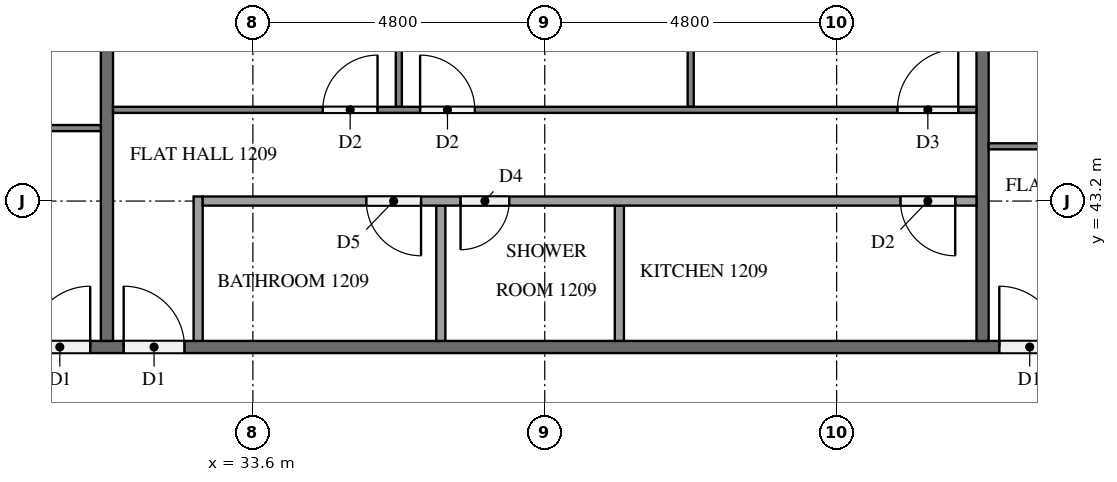
"""IFC4 building model, lengths in metres.
Left out: names, types, materials, properties, quantities, classifications, styles, units other than length and angle.
Written with IfcOpenShell. Run it as: python <this file> out.ifc"""

import sys

from ifc_helpers import new_model, si_unit, direction, frame, frame_2d, origin, place, context, subcontext, project, spatial, rectangle, extrude, element, fill, save


model = new_model("IFC4")
c1 = context("Model", 3, precision=1e-05, world=origin(), true_north=direction((0.0, 1.0)))
c2 = subcontext(c1, "Body", "Model", "MODEL_VIEW")
j1 = project(units=[si_unit("LENGTHUNIT", "METRE"), si_unit("PLANEANGLEUNIT", "RADIAN")], contexts=[c1])
p1 = place(None, origin())
s1 = spatial("IfcSite", under=j1, at=p1, CompositionType="ELEMENT")
p2 = place(p1, origin())
s2 = spatial("IfcBuilding", under=s1, at=p2, CompositionType="ELEMENT")
p3 = place(p2, frame((0.0, 0.0, 50.4)))
s3 = spatial("IfcBuildingStorey", under=s2, at=p3, CompositionType="ELEMENT", Elevation=50.4)
p4 = place(p3, frame((11.9, 40.8, 0.0), z_axis=(0.0, 0.0, 1.0), x_axis=(1.0, 0.0, 0.0)))
e1 = element("IfcWall", 1, at=p4, inside=s3, PredefinedType="PARTITIONING", context=c2, shape_type="SweptSolid", body=[
    extrude(rectangle(XDim=38.6, YDim=0.2, at=frame_2d((19.3, 0.0))), origin(), (0.0, 0.0, 1.0), 3.1),
])
p5 = place(p4, frame((33.975, 0.0, 0.0)))
e2 = element("IfcOpeningElement", 2, at=p5, cuts=e1, PredefinedType="OPENING", context=c2, shape_type="SweptSolid", body=[
    extrude(rectangle(XDim=1.0, YDim=2.1, at=frame_2d((0.5, 1.05))), frame((0.0, 0.11, 0.0), z_axis=(0.0, -1.0, 0.0), x_axis=(1.0, 0.0, 0.0)), (0.0, 0.0, 1.0), 0.22),
])
p6 = place(p4, frame((19.575, 0.0, 0.0)))
e3 = element("IfcOpeningElement", 3, at=p6, cuts=e1, PredefinedType="OPENING", context=c2, shape_type="SweptSolid", body=[
    extrude(rectangle(XDim=1.0, YDim=2.1, at=frame_2d((0.5, 1.05))), frame((0.0, 0.11, 0.0), z_axis=(0.0, -1.0, 0.0), x_axis=(1.0, 0.0, 0.0)), (0.0, 0.0, 1.0), 0.22),
])
p7 = place(p4, frame((18.025, 0.0, 0.0)))
e4 = element("IfcOpeningElement", 4, at=p7, cuts=e1, PredefinedType="OPENING", context=c2, shape_type="SweptSolid", body=[
    extrude(rectangle(XDim=1.0, YDim=2.1, at=frame_2d((0.5, 1.05))), frame((0.0, 0.11, 0.0), z_axis=(0.0, -1.0, 0.0), x_axis=(1.0, 0.0, 0.0)), (0.0, 0.0, 1.0), 0.22),
])
p8 = place(p4, frame((3.625, 0.0, 0.0)))
e5 = element("IfcOpeningElement", 5, at=p8, cuts=e1, PredefinedType="OPENING", context=c2, shape_type="SweptSolid", body=[
    extrude(rectangle(XDim=1.0, YDim=2.1, at=frame_2d((0.5, 1.05))), frame((0.0, 0.11, 0.0), z_axis=(0.0, -1.0, 0.0), x_axis=(1.0, 0.0, 0.0)), (0.0, 0.0, 1.0), 0.22),
])
for number, where, z_axis, x_axis in (
    (6, (45.6, 47.9, 0.0), (0.0, 0.0, 1.0), (0.0, -1.0, 0.0)),
    (7, (31.2, 47.9, 0.0), (0.0, 0.0, 1.0), (0.0, -1.0, 0.0)),
):
    element("IfcWall", number, at=place(p3, frame(where, z_axis=z_axis, x_axis=x_axis)), inside=s3, PredefinedType="PARTITIONING", context=c2, shape_type="SweptSolid", body=[
        extrude(rectangle(XDim=7.0, YDim=0.2, at=frame_2d((3.5, 0.0))), origin(), (0.0, 0.0, 1.0), 3.1),
    ])
p9 = place(p3, frame((45.7, 44.1, 0.0), z_axis=(0.0, 0.0, 1.0), x_axis=(1.0, 0.0, 0.0)))
e8 = element("IfcWall", 8, at=p9, inside=s3, PredefinedType="PARTITIONING", context=c2, shape_type="SweptSolid", body=[
    extrude(rectangle(XDim=11.559, YDim=0.1, at=frame_2d((5.779, 0.0))), origin(), (0.0, 0.0, 1.0), 3.1),
])
p10 = place(p9, frame((3.45, 0.0, 0.0)))
e9 = element("IfcOpeningElement", 9, at=p10, cuts=e8, PredefinedType="OPENING", context=c2, shape_type="SweptSolid", body=[
    extrude(rectangle(XDim=0.9, YDim=2.1, at=frame_2d((0.45, 1.05))), frame((0.0, 0.06, 0.0), z_axis=(0.0, -1.0, 0.0), x_axis=(1.0, 0.0, 0.0)), (0.0, 0.0, 1.0), 0.12),
])
p11 = place(p9, frame((5.05, 0.0, 0.0)))
e10 = element("IfcOpeningElement", 10, at=p11, cuts=e8, PredefinedType="OPENING", context=c2, shape_type="SweptSolid", body=[
    extrude(rectangle(XDim=1.0, YDim=2.1, at=frame_2d((0.5, 1.05))), frame((0.0, 0.06, 0.0), z_axis=(0.0, -1.0, 0.0), x_axis=(1.0, 0.0, 0.0)), (0.0, 0.0, 1.0), 0.12),
])
for number, where, z_axis, x_axis in (
    (11, (36.0, 44.75, 0.0), (0.0, 0.0, 1.0), (0.0, 1.0, 0.0)),
    (12, (40.8, 44.75, 0.0), (0.0, 0.0, 1.0), (0.0, 1.0, 0.0)),
):
    element("IfcWall", number, at=place(p3, frame(where, z_axis=z_axis, x_axis=x_axis)), inside=s3, PredefinedType="PARTITIONING", context=c2, shape_type="SweptSolid", body=[
        extrude(rectangle(XDim=3.15, YDim=0.1, at=frame_2d((1.575, 0.0))), origin(), (0.0, 0.0, 1.0), 3.1),
    ])
p12 = place(p3, frame((31.3, 44.7, 0.0), z_axis=(0.0, 0.0, 1.0), x_axis=(1.0, 0.0, 0.0)))
e13 = element("IfcWall", 13, at=p12, inside=s3, PredefinedType="PARTITIONING", context=c2, shape_type="SweptSolid", body=[
    extrude(rectangle(XDim=14.2, YDim=0.1, at=frame_2d((7.1, 0.0))), origin(), (0.0, 0.0, 1.0), 3.1),
])
p13 = place(p12, frame((3.45, 0.0, 0.0)))
e14 = element("IfcOpeningElement", 14, at=p13, cuts=e13, PredefinedType="OPENING", context=c2, shape_type="SweptSolid", body=[
    extrude(rectangle(XDim=0.9, YDim=2.1, at=frame_2d((0.45, 1.05))), frame((0.0, 0.06, 0.0), z_axis=(0.0, -1.0, 0.0), x_axis=(1.0, 0.0, 0.0)), (0.0, 0.0, 1.0), 0.12),
])
p14 = place(p12, frame((5.05, 0.0, 0.0)))
e15 = element("IfcOpeningElement", 15, at=p14, cuts=e13, PredefinedType="OPENING", context=c2, shape_type="SweptSolid", body=[
    extrude(rectangle(XDim=0.9, YDim=2.1, at=frame_2d((0.45, 1.05))), frame((0.0, 0.06, 0.0), z_axis=(0.0, -1.0, 0.0), x_axis=(1.0, 0.0, 0.0)), (0.0, 0.0, 1.0), 0.12),
])
p15 = place(p12, frame((12.9, 0.0, 0.0)))
e16 = element("IfcOpeningElement", 16, at=p15, cuts=e13, PredefinedType="OPENING", context=c2, shape_type="SweptSolid", body=[
    extrude(rectangle(XDim=1.0, YDim=2.1, at=frame_2d((0.5, 1.05))), frame((0.0, 0.06, 0.0), z_axis=(0.0, -1.0, 0.0), x_axis=(1.0, 0.0, 0.0)), (0.0, 0.0, 1.0), 0.12),
])
for number, where, z_axis, x_axis in (
    (17, (36.69, 40.9, 0.0), (0.0, 0.0, 1.0), (0.0, 1.0, 0.0)),
    (18, (39.627, 40.9, 0.0), (0.0, 0.0, 1.0), (0.0, 1.0, 0.0)),
):
    element("IfcWall", number, at=place(p3, frame(where, z_axis=z_axis, x_axis=x_axis)), inside=s3, PredefinedType="PARTITIONING", context=c2, shape_type="SweptSolid", body=[
        extrude(rectangle(XDim=2.225, YDim=0.15, at=frame_2d((1.113, 0.0))), origin(), (0.0, 0.0, 1.0), 3.1),
    ])
p16 = place(p3, frame((32.7, 40.9, 0.0), z_axis=(0.0, 0.0, 1.0), x_axis=(0.0, 1.0, 0.0)))
e19 = element("IfcWall", 19, at=p16, inside=s3, PredefinedType="PARTITIONING", context=c2, shape_type="SweptSolid", body=[
    extrude(rectangle(XDim=2.375, YDim=0.15, at=frame_2d((1.188, 0.0))), origin(), (0.0, 0.0, 1.0), 3.1),
])
p17 = place(p3, frame((45.5, 43.2, 0.0), z_axis=(0.0, 0.0, 1.0), x_axis=(-1.0, 0.0, 0.0)))
e20 = element("IfcWall", 20, at=p17, inside=s3, PredefinedType="PARTITIONING", context=c2, shape_type="SweptSolid", body=[
    extrude(rectangle(XDim=12.725, YDim=0.15, at=frame_2d((6.363, 0.0))), origin(), (0.0, 0.0, 1.0), 3.1),
])
p18 = place(p17, frame((9.135, 0.0, 0.0)))
e21 = element("IfcOpeningElement", 21, at=p18, cuts=e20, PredefinedType="OPENING", context=c2, shape_type="SweptSolid", body=[
    extrude(rectangle(XDim=0.9, YDim=2.1, at=frame_2d((0.45, 1.05))), frame((0.0, 0.085, 0.0), z_axis=(0.0, -1.0, 0.0), x_axis=(1.0, 0.0, 0.0)), (0.0, 0.0, 1.0), 0.17),
])
p19 = place(p17, frame((7.685, 0.0, 0.0)))
e22 = element("IfcOpeningElement", 22, at=p19, cuts=e20, PredefinedType="OPENING", context=c2, shape_type="SweptSolid", body=[
    extrude(rectangle(XDim=0.8, YDim=2.1, at=frame_2d((0.4, 1.05))), frame((0.0, 0.085, 0.0), z_axis=(0.0, -1.0, 0.0), x_axis=(1.0, 0.0, 0.0)), (0.0, 0.0, 1.0), 0.17),
])
p20 = place(p17, frame((0.35, 0.0, 0.0)))
e23 = element("IfcOpeningElement", 23, at=p20, cuts=e20, PredefinedType="OPENING", context=c2, shape_type="SweptSolid", body=[
    extrude(rectangle(XDim=0.9, YDim=2.1, at=frame_2d((0.45, 1.05))), frame((0.0, 0.085, 0.0), z_axis=(0.0, -1.0, 0.0), x_axis=(1.0, 0.0, 0.0)), (0.0, 0.0, 1.0), 0.17),
])
p21 = place(p3, frame((16.9, 44.4, 0.0), z_axis=(0.0, 0.0, 1.0), x_axis=(1.0, 0.0, 0.0)))
e24 = element("IfcWall", 24, at=p21, inside=s3, PredefinedType="PARTITIONING", context=c2, shape_type="SweptSolid", body=[
    extrude(rectangle(XDim=14.2, YDim=0.1, at=frame_2d((7.1, 0.0))), origin(), (0.0, 0.0, 1.0), 3.1),
])
p22 = place(p21, frame((9.85, 0.0, 0.0)))
e25 = element("IfcOpeningElement", 25, at=p22, cuts=e24, PredefinedType="OPENING", context=c2, shape_type="SweptSolid", body=[
    extrude(rectangle(XDim=1.0, YDim=2.1, at=frame_2d((0.5, 1.05))), frame((0.0, 0.06, 0.0), z_axis=(0.0, -1.0, 0.0), x_axis=(1.0, 0.0, 0.0)), (0.0, 0.0, 1.0), 0.12),
])
p23 = place(p21, frame((8.25, 0.0, 0.0)))
e26 = element("IfcOpeningElement", 26, at=p23, cuts=e24, PredefinedType="OPENING", context=c2, shape_type="SweptSolid", body=[
    extrude(rectangle(XDim=0.9, YDim=2.1, at=frame_2d((0.45, 1.05))), frame((0.0, 0.06, 0.0), z_axis=(0.0, -1.0, 0.0), x_axis=(1.0, 0.0, 0.0)), (0.0, 0.0, 1.0), 0.12),
])
p24 = place(p21, frame((0.3, 0.0, 0.0)))
e27 = element("IfcOpeningElement", 27, at=p24, cuts=e24, PredefinedType="OPENING", context=c2, shape_type="SweptSolid", body=[
    extrude(rectangle(XDim=0.9, YDim=2.1, at=frame_2d((0.45, 1.05))), frame((0.0, 0.06, 0.0), z_axis=(0.0, -1.0, 0.0), x_axis=(1.0, 0.0, 0.0)), (0.0, 0.0, 1.0), 0.12),
])
p25 = place(p5, origin())
e28 = element("IfcDoor", 28, at=p25, inside=s3, OperationType="SINGLE_SWING_LEFT", PredefinedType="DOOR", context=c2, shape_type="SweptSolid", body=[
    extrude(rectangle(XDim=1.0, YDim=2.1, at=frame_2d((0.5, 1.05))), frame((0.0, 0.025, 0.0), z_axis=(0.0, -1.0, 0.0), x_axis=(1.0, 0.0, 0.0)), (0.0, 0.0, 1.0), 0.05),
])
fill(e2, e28)
p26 = place(p6, origin())
e29 = element("IfcDoor", 29, at=p26, inside=s3, OperationType="SINGLE_SWING_LEFT", PredefinedType="DOOR", context=c2, shape_type="SweptSolid", body=[
    extrude(rectangle(XDim=1.0, YDim=2.1, at=frame_2d((0.5, 1.05))), frame((0.0, 0.025, 0.0), z_axis=(0.0, -1.0, 0.0), x_axis=(1.0, 0.0, 0.0)), (0.0, 0.0, 1.0), 0.05),
])
fill(e3, e29)
p27 = place(p7, origin())
e30 = element("IfcDoor", 30, at=p27, inside=s3, OperationType="SINGLE_SWING_RIGHT", PredefinedType="DOOR", context=c2, shape_type="SweptSolid", body=[
    extrude(rectangle(XDim=1.0, YDim=2.1, at=frame_2d((0.5, 1.05))), frame((0.0, 0.025, 0.0), z_axis=(0.0, -1.0, 0.0), x_axis=(1.0, 0.0, 0.0)), (0.0, 0.0, 1.0), 0.05),
])
fill(e4, e30)
p28 = place(p13, origin())
e31 = element("IfcDoor", 31, at=p28, inside=s3, OperationType="SINGLE_SWING_RIGHT", PredefinedType="DOOR", context=c2, shape_type="SweptSolid", body=[
    extrude(rectangle(XDim=0.9, YDim=2.1, at=frame_2d((0.45, 1.05))), frame((0.0, 0.025, 0.0), z_axis=(0.0, -1.0, 0.0), x_axis=(1.0, 0.0, 0.0)), (0.0, 0.0, 1.0), 0.05),
])
fill(e14, e31)
p29 = place(p14, origin())
e32 = element("IfcDoor", 32, at=p29, inside=s3, OperationType="SINGLE_SWING_LEFT", PredefinedType="DOOR", context=c2, shape_type="SweptSolid", body=[
    extrude(rectangle(XDim=0.9, YDim=2.1, at=frame_2d((0.45, 1.05))), frame((0.0, 0.025, 0.0), z_axis=(0.0, -1.0, 0.0), x_axis=(1.0, 0.0, 0.0)), (0.0, 0.0, 1.0), 0.05),
])
fill(e15, e32)
p30 = place(p15, origin())
e33 = element("IfcDoor", 33, at=p30, inside=s3, OperationType="SINGLE_SWING_RIGHT", PredefinedType="DOOR", context=c2, shape_type="SweptSolid", body=[
    extrude(rectangle(XDim=1.0, YDim=2.1, at=frame_2d((0.5, 1.05))), frame((0.0, 0.025, 0.0), z_axis=(0.0, -1.0, 0.0), x_axis=(1.0, 0.0, 0.0)), (0.0, 0.0, 1.0), 0.05),
])
fill(e16, e33)
p31 = place(p18, origin())
e34 = element("IfcDoor", 34, at=p31, inside=s3, OperationType="SINGLE_SWING_LEFT", PredefinedType="DOOR", context=c2, shape_type="SweptSolid", body=[
    extrude(rectangle(XDim=0.9, YDim=2.1, at=frame_2d((0.45, 1.05))), frame((0.0, 0.025, 0.0), z_axis=(0.0, -1.0, 0.0), x_axis=(1.0, 0.0, 0.0)), (0.0, 0.0, 1.0), 0.05),
])
fill(e21, e34)
p32 = place(p19, origin())
e35 = element("IfcDoor", 35, at=p32, inside=s3, OperationType="SINGLE_SWING_RIGHT", PredefinedType="DOOR", context=c2, shape_type="SweptSolid", body=[
    extrude(rectangle(XDim=0.8, YDim=2.1, at=frame_2d((0.4, 1.05))), frame((0.0, 0.025, 0.0), z_axis=(0.0, -1.0, 0.0), x_axis=(1.0, 0.0, 0.0)), (0.0, 0.0, 1.0), 0.05),
])
fill(e22, e35)
p33 = place(p20, origin())
e36 = element("IfcDoor", 36, at=p33, inside=s3, OperationType="SINGLE_SWING_LEFT", PredefinedType="DOOR", context=c2, shape_type="SweptSolid", body=[
    extrude(rectangle(XDim=0.9, YDim=2.1, at=frame_2d((0.45, 1.05))), frame((0.0, 0.025, 0.0), z_axis=(0.0, -1.0, 0.0), x_axis=(1.0, 0.0, 0.0)), (0.0, 0.0, 1.0), 0.05),
])
fill(e23, e36)
save(model, sys.argv[1])
